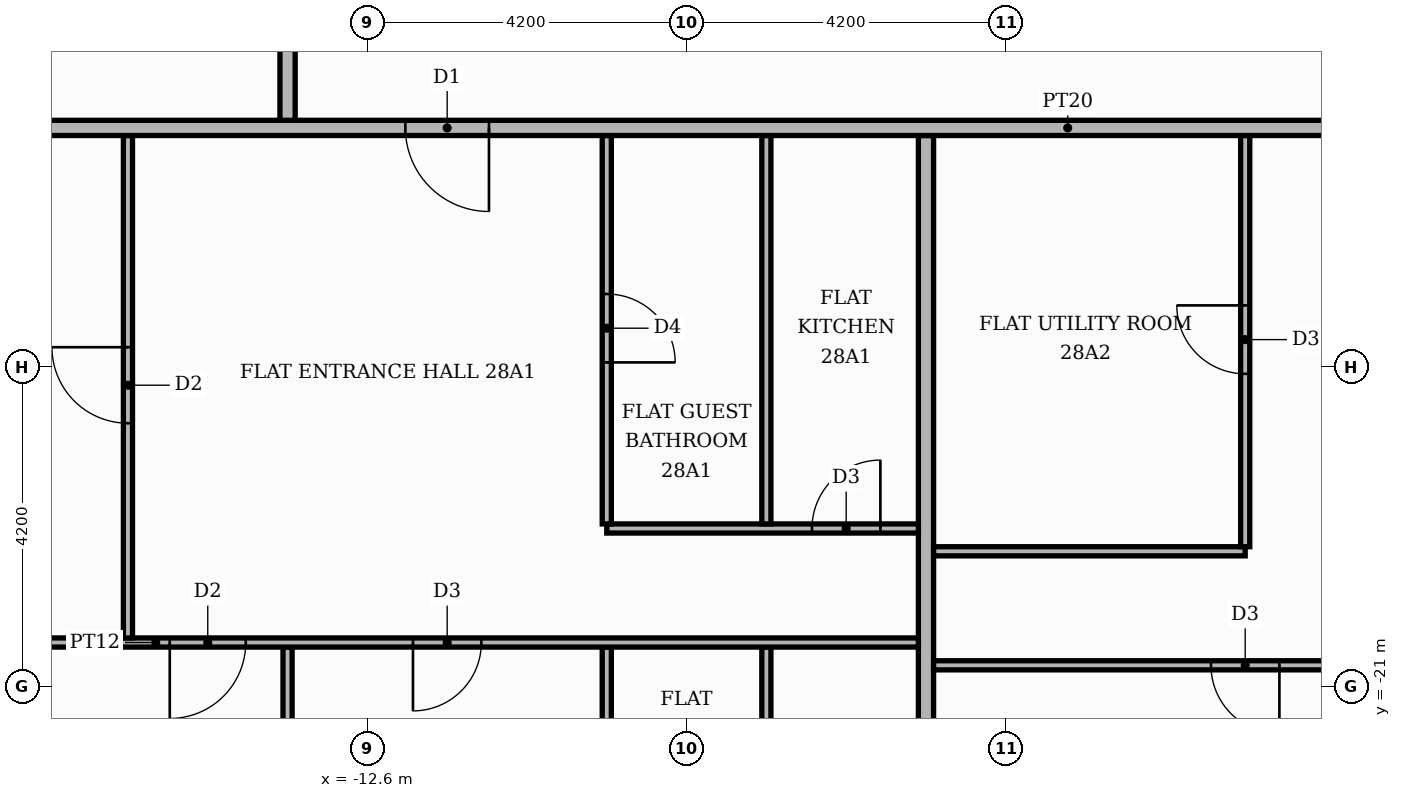
"""IFC4 building model, lengths in metres.
Left out: names, types, materials, properties, quantities, classifications, styles, units other than length and angle.
Written with IfcOpenShell. Run it as: python <this file> out.ifc"""

import sys

from ifc_helpers import new_model, si_unit, direction, frame, frame_2d, origin, place, context, subcontext, project, spatial, rectangle, extrude, element, fill, save


model = new_model("IFC4")
c1 = context("Model", 3, precision=1e-05, world=origin(), true_north=direction((0.0, 1.0)))
c2 = subcontext(c1, "Body", "Model", "MODEL_VIEW")
j1 = project(units=[si_unit("LENGTHUNIT", "METRE"), si_unit("PLANEANGLEUNIT", "RADIAN")], contexts=[c1])
p1 = place(None, origin())
s1 = spatial("IfcSite", under=j1, at=p1, CompositionType="ELEMENT")
p2 = place(p1, origin())
s2 = spatial("IfcBuilding", under=s1, at=p2, CompositionType="ELEMENT")
p3 = place(p2, frame((0.0, 0.0, 118.2)))
s3 = spatial("IfcBuildingStorey", under=s2, at=p3, CompositionType="ELEMENT", Elevation=118.2)
p4 = place(p3, frame((-13.65, -25.42, 0.0), z_axis=(0.0, 0.0, 1.0), x_axis=(0.0, 1.0, 0.0)))
e1 = element("IfcWall", 1, at=p4, inside=s3, PredefinedType="PARTITIONING", context=c2, shape_type="SweptSolid", body=[
    extrude(rectangle(XDim=4.94, YDim=0.12, at=frame_2d((2.47, 0.0))), origin(), (0.0, 0.0, 1.0), 3.48),
])
p5 = place(p3, frame((-9.45, -25.42, 0.0), z_axis=(0.0, 0.0, 1.0), x_axis=(0.0, 1.0, 0.0)))
e2 = element("IfcWall", 2, at=p5, inside=s3, PredefinedType="PARTITIONING", context=c2, shape_type="SweptSolid", body=[
    extrude(rectangle(XDim=4.94, YDim=0.12, at=frame_2d((2.47, 0.0))), origin(), (0.0, 0.0, 1.0), 3.48),
])
p6 = place(p5, frame((1.9, 0.0, 0.0)))
e3 = element("IfcOpeningElement", 3, at=p6, cuts=e2, PredefinedType="OPENING", context=c2, shape_type="SweptSolid", body=[
    extrude(rectangle(XDim=0.9, YDim=2.1, at=frame_2d((0.45, 1.05))), frame((0.0, 0.07, 0.0), z_axis=(0.0, -1.0, 0.0), x_axis=(1.0, 0.0, 0.0)), (0.0, 0.0, 1.0), 0.14),
])
p7 = place(p3, frame((-7.35, -25.42, 0.0), z_axis=(0.0, 0.0, 1.0), x_axis=(0.0, 1.0, 0.0)))
e4 = element("IfcWall", 4, at=p7, inside=s3, PredefinedType="PARTITIONING", context=c2, shape_type="SweptSolid", body=[
    extrude(rectangle(XDim=4.94, YDim=0.12, at=frame_2d((2.47, 0.0))), origin(), (0.0, 0.0, 1.0), 3.48),
])
p8 = place(p7, frame((1.9, 0.0, 0.0)))
e5 = element("IfcOpeningElement", 5, at=p8, cuts=e4, PredefinedType="OPENING", context=c2, shape_type="SweptSolid", body=[
    extrude(rectangle(XDim=0.9, YDim=2.1, at=frame_2d((0.45, 1.05))), frame((0.0, 0.07, 0.0), z_axis=(0.0, -1.0, 0.0), x_axis=(1.0, 0.0, 0.0)), (0.0, 0.0, 1.0), 0.14),
])
p9 = place(p3, frame((-5.25, -25.42, 0.0), z_axis=(0.0, 0.0, 1.0), x_axis=(0.0, 1.0, 0.0)))
e6 = element("IfcWall", 6, at=p9, inside=s3, PredefinedType="PARTITIONING", context=c2, shape_type="SweptSolid", body=[
    extrude(rectangle(XDim=11.67, YDim=0.2, at=frame_2d((5.835, 0.0))), origin(), (0.0, 0.0, 1.0), 3.48),
])
p10 = place(p3, frame((-5.15, -20.72, 0.0), z_axis=(0.0, 0.0, 1.0), x_axis=(1.0, 0.0, 0.0)))
e7 = element("IfcWall", 7, at=p10, inside=s3, PredefinedType="PARTITIONING", context=c2, shape_type="SweptSolid", body=[
    extrude(rectangle(XDim=18.7, YDim=0.12, at=frame_2d((9.35, 0.0))), origin(), (0.0, 0.0, 1.0), 3.48),
])
p11 = place(p10, frame((3.65, 0.0, 0.0)))
e8 = element("IfcOpeningElement", 8, at=p11, cuts=e7, PredefinedType="OPENING", context=c2, shape_type="SweptSolid", body=[
    extrude(rectangle(XDim=0.9, YDim=2.1, at=frame_2d((0.45, 1.05))), frame((0.0, 0.07, 0.0), z_axis=(0.0, -1.0, 0.0), x_axis=(1.0, 0.0, 0.0)), (0.0, 0.0, 1.0), 0.14),
])
p12 = place(p10, frame((15.15, 0.0, 0.0)))
e9 = element("IfcOpeningElement", 9, at=p12, cuts=e7, PredefinedType="OPENING", context=c2, shape_type="SweptSolid", body=[
    extrude(rectangle(XDim=1.0, YDim=2.1, at=frame_2d((0.5, 1.05))), frame((0.0, 0.07, 0.0), z_axis=(0.0, -1.0, 0.0), x_axis=(1.0, 0.0, 0.0)), (0.0, 0.0, 1.0), 0.14),
])
p13 = place(p3, frame((-25.42, -20.42, 0.0), z_axis=(0.0, 0.0, 1.0), x_axis=(1.0, 0.0, 0.0)))
e10 = element("IfcWall", 10, at=p13, inside=s3, PredefinedType="PARTITIONING", context=c2, shape_type="SweptSolid", body=[
    extrude(rectangle(XDim=20.07, YDim=0.12, at=frame_2d((10.035, 0.0))), origin(), (0.0, 0.0, 1.0), 3.48),
])
p14 = place(p13, frame((10.22, 0.0, 0.0)))
e11 = element("IfcOpeningElement", 11, at=p14, cuts=e10, PredefinedType="OPENING", context=c2, shape_type="SweptSolid", body=[
    extrude(rectangle(XDim=1.0, YDim=2.1, at=frame_2d((0.5, 1.05))), frame((0.0, 0.07, 0.0), z_axis=(0.0, -1.0, 0.0), x_axis=(1.0, 0.0, 0.0)), (0.0, 0.0, 1.0), 0.14),
])
p15 = place(p13, frame((13.42, 0.0, 0.0)))
e12 = element("IfcOpeningElement", 12, at=p15, cuts=e10, PredefinedType="OPENING", context=c2, shape_type="SweptSolid", body=[
    extrude(rectangle(XDim=0.9, YDim=2.1, at=frame_2d((0.45, 1.05))), frame((0.0, 0.07, 0.0), z_axis=(0.0, -1.0, 0.0), x_axis=(1.0, 0.0, 0.0)), (0.0, 0.0, 1.0), 0.14),
])
p16 = place(p3, frame((-15.75, -20.36, 0.0), z_axis=(0.0, 0.0, 1.0), x_axis=(0.0, 1.0, 0.0)))
e13 = element("IfcWall", 13, at=p16, inside=s3, PredefinedType="PARTITIONING", context=c2, shape_type="SweptSolid", body=[
    extrude(rectangle(XDim=6.61, YDim=0.12, at=frame_2d((3.305, 0.0))), origin(), (0.0, 0.0, 1.0), 3.48),
])
p17 = place(p16, frame((2.825, 0.0, 0.0)))
e14 = element("IfcOpeningElement", 14, at=p17, cuts=e13, PredefinedType="OPENING", context=c2, shape_type="SweptSolid", body=[
    extrude(rectangle(XDim=1.0, YDim=2.1, at=frame_2d((0.5, 1.05))), frame((0.0, 0.07, 0.0), z_axis=(0.0, -1.0, 0.0), x_axis=(1.0, 0.0, 0.0)), (0.0, 0.0, 1.0), 0.14),
])
p18 = place(p3, frame((-5.15, -19.22, 0.0), z_axis=(0.0, 0.0, 1.0), x_axis=(1.0, 0.0, 0.0)))
e15 = element("IfcWall", 15, at=p18, inside=s3, PredefinedType="PARTITIONING", context=c2, shape_type="SweptSolid", body=[
    extrude(rectangle(XDim=4.1, YDim=0.12, at=frame_2d((2.05, 0.0))), origin(), (0.0, 0.0, 1.0), 3.48),
])
p19 = place(p3, frame((-1.05, -19.16, 0.0), z_axis=(0.0, 0.0, 1.0), x_axis=(0.0, 1.0, 0.0)))
e16 = element("IfcWall", 16, at=p19, inside=s3, PredefinedType="PARTITIONING", context=c2, shape_type="SweptSolid", body=[
    extrude(rectangle(XDim=5.41, YDim=0.12, at=frame_2d((2.705, 0.0))), origin(), (0.0, 0.0, 1.0), 3.48),
])
p20 = place(p19, frame((2.275, 0.0, 0.0)))
e17 = element("IfcOpeningElement", 17, at=p20, cuts=e16, PredefinedType="OPENING", context=c2, shape_type="SweptSolid", body=[
    extrude(rectangle(XDim=0.9, YDim=2.1, at=frame_2d((0.45, 1.05))), frame((0.0, 0.07, 0.0), z_axis=(0.0, -1.0, 0.0), x_axis=(1.0, 0.0, 0.0)), (0.0, 0.0, 1.0), 0.14),
])
p21 = place(p3, frame((-9.45, -18.92, 0.0), z_axis=(0.0, 0.0, 1.0), x_axis=(1.0, 0.0, 0.0)))
e18 = element("IfcWall", 18, at=p21, inside=s3, PredefinedType="PARTITIONING", context=c2, shape_type="SweptSolid", body=[
    extrude(rectangle(XDim=4.1, YDim=0.12, at=frame_2d((2.05, 0.0))), origin(), (0.0, 0.0, 1.0), 3.48),
])
p22 = place(p21, frame((2.7, 0.0, 0.0)))
e19 = element("IfcOpeningElement", 19, at=p22, cuts=e18, PredefinedType="OPENING", context=c2, shape_type="SweptSolid", body=[
    extrude(rectangle(XDim=0.9, YDim=2.1, at=frame_2d((0.45, 1.05))), frame((0.0, 0.07, 0.0), z_axis=(0.0, -1.0, 0.0), x_axis=(1.0, 0.0, 0.0)), (0.0, 0.0, 1.0), 0.14),
])
p23 = place(p3, frame((-9.45, -18.86, 0.0), z_axis=(0.0, 0.0, 1.0), x_axis=(0.0, 1.0, 0.0)))
e20 = element("IfcWall", 20, at=p23, inside=s3, PredefinedType="PARTITIONING", context=c2, shape_type="SweptSolid", body=[
    extrude(rectangle(XDim=5.11, YDim=0.12, at=frame_2d((2.555, 0.0))), origin(), (0.0, 0.0, 1.0), 3.48),
])
p24 = place(p23, frame((2.125, 0.0, 0.0)))
e21 = element("IfcOpeningElement", 21, at=p24, cuts=e20, PredefinedType="OPENING", context=c2, shape_type="SweptSolid", body=[
    extrude(rectangle(XDim=0.9, YDim=2.1, at=frame_2d((0.45, 1.05))), frame((0.0, 0.07, 0.0), z_axis=(0.0, -1.0, 0.0), x_axis=(1.0, 0.0, 0.0)), (0.0, 0.0, 1.0), 0.14),
])
p25 = place(p3, frame((-7.35, -18.86, 0.0), z_axis=(0.0, 0.0, 1.0), x_axis=(0.0, 1.0, 0.0)))
e22 = element("IfcWall", 22, at=p25, inside=s3, PredefinedType="PARTITIONING", context=c2, shape_type="SweptSolid", body=[
    extrude(rectangle(XDim=5.11, YDim=0.12, at=frame_2d((2.555, 0.0))), origin(), (0.0, 0.0, 1.0), 3.48),
])
p26 = place(p3, frame((-20.42, -13.65, 0.0), z_axis=(0.0, 0.0, 1.0), x_axis=(1.0, 0.0, 0.0)))
e23 = element("IfcWall", 23, at=p26, inside=s3, PredefinedType="PARTITIONING", context=c2, shape_type="SweptSolid", body=[
    extrude(rectangle(XDim=34.07, YDim=0.2, at=frame_2d((17.035, 0.0))), origin(), (0.0, 0.0, 1.0), 3.48),
])
p27 = place(p26, frame((8.32, 0.0, 0.0)))
e24 = element("IfcOpeningElement", 24, at=p27, cuts=e23, PredefinedType="OPENING", context=c2, shape_type="SweptSolid", body=[
    extrude(rectangle(XDim=1.1, YDim=2.4, at=frame_2d((0.55, 1.2))), frame((0.0, 0.11, 0.0), z_axis=(0.0, -1.0, 0.0), x_axis=(1.0, 0.0, 0.0)), (0.0, 0.0, 1.0), 0.22),
])
p28 = place(p26, frame((20.92, 0.0, 0.0)))
e25 = element("IfcOpeningElement", 25, at=p28, cuts=e23, PredefinedType="OPENING", context=c2, shape_type="SweptSolid", body=[
    extrude(rectangle(XDim=1.1, YDim=2.4, at=frame_2d((0.55, 1.2))), frame((0.0, 0.11, 0.0), z_axis=(0.0, -1.0, 0.0), x_axis=(1.0, 0.0, 0.0)), (0.0, 0.0, 1.0), 0.22),
])
p29 = place(p3, frame((-13.65, -13.55, 0.0), z_axis=(0.0, 0.0, 1.0), x_axis=(0.0, 1.0, 0.0)))
e26 = element("IfcWall", 26, at=p29, inside=s3, PredefinedType="PARTITIONING", context=c2, shape_type="SweptSolid", body=[
    extrude(rectangle(XDim=18.7, YDim=0.2, at=frame_2d((9.35, 0.0))), origin(), (0.0, 0.0, 1.0), 3.48),
])
p30 = place(p29, frame((14.05, 0.0, 0.0)))
e27 = element("IfcOpeningElement", 27, at=p30, cuts=e26, PredefinedType="OPENING", context=c2, shape_type="SweptSolid", body=[
    extrude(rectangle(XDim=1.1, YDim=2.4, at=frame_2d((0.55, 1.2))), frame((0.0, 0.11, 0.0), z_axis=(0.0, -1.0, 0.0), x_axis=(1.0, 0.0, 0.0)), (0.0, 0.0, 1.0), 0.22),
])
p31 = place(p27, frame((1.1, 0.0, 0.0), z_axis=(0.0, 0.0, 1.0), x_axis=(-1.0, 0.0, 0.0)))
e28 = element("IfcDoor", 28, at=p31, inside=s3, OperationType="SINGLE_SWING_RIGHT", PredefinedType="DOOR", context=c2, shape_type="SweptSolid", body=[
    extrude(rectangle(XDim=1.1, YDim=2.4, at=frame_2d((0.55, 1.2))), frame((0.0, 0.025, 0.0), z_axis=(0.0, -1.0, 0.0), x_axis=(1.0, 0.0, 0.0)), (0.0, 0.0, 1.0), 0.05),
])
fill(e24, e28)
p32 = place(p17, origin())
e29 = element("IfcDoor", 29, at=p32, inside=s3, OperationType="SINGLE_SWING_RIGHT", PredefinedType="DOOR", context=c2, shape_type="SweptSolid", body=[
    extrude(rectangle(XDim=1.0, YDim=2.1, at=frame_2d((0.5, 1.05))), frame((0.0, 0.025, 0.0), z_axis=(0.0, -1.0, 0.0), x_axis=(1.0, 0.0, 0.0)), (0.0, 0.0, 1.0), 0.05),
])
fill(e14, e29)
p33 = place(p24, frame((0.9, 0.0, 0.0), z_axis=(0.0, 0.0, 1.0), x_axis=(-1.0, 0.0, 0.0)))
e30 = element("IfcDoor", 30, at=p33, inside=s3, OperationType="SINGLE_SWING_LEFT", PredefinedType="DOOR", context=c2, shape_type="SweptSolid", body=[
    extrude(rectangle(XDim=0.9, YDim=2.1, at=frame_2d((0.45, 1.05))), frame((0.0, 0.025, 0.0), z_axis=(0.0, -1.0, 0.0), x_axis=(1.0, 0.0, 0.0)), (0.0, 0.0, 1.0), 0.05),
])
fill(e21, e30)
p34 = place(p22, origin())
e31 = element("IfcDoor", 31, at=p34, inside=s3, OperationType="SINGLE_SWING_RIGHT", PredefinedType="DOOR", context=c2, shape_type="SweptSolid", body=[
    extrude(rectangle(XDim=0.9, YDim=2.1, at=frame_2d((0.45, 1.05))), frame((0.0, 0.025, 0.0), z_axis=(0.0, -1.0, 0.0), x_axis=(1.0, 0.0, 0.0)), (0.0, 0.0, 1.0), 0.05),
])
fill(e19, e31)
p35 = place(p14, frame((1.0, 0.0, 0.0), z_axis=(0.0, 0.0, 1.0), x_axis=(-1.0, 0.0, 0.0)))
e32 = element("IfcDoor", 32, at=p35, inside=s3, OperationType="SINGLE_SWING_LEFT", PredefinedType="DOOR", context=c2, shape_type="SweptSolid", body=[
    extrude(rectangle(XDim=1.0, YDim=2.1, at=frame_2d((0.5, 1.05))), frame((0.0, 0.025, 0.0), z_axis=(0.0, -1.0, 0.0), x_axis=(1.0, 0.0, 0.0)), (0.0, 0.0, 1.0), 0.05),
])
fill(e11, e32)
p36 = place(p15, frame((0.9, 0.0, 0.0), z_axis=(0.0, 0.0, 1.0), x_axis=(-1.0, 0.0, 0.0)))
e33 = element("IfcDoor", 33, at=p36, inside=s3, OperationType="SINGLE_SWING_LEFT", PredefinedType="DOOR", context=c2, shape_type="SweptSolid", body=[
    extrude(rectangle(XDim=0.9, YDim=2.1, at=frame_2d((0.45, 1.05))), frame((0.0, 0.025, 0.0), z_axis=(0.0, -1.0, 0.0), x_axis=(1.0, 0.0, 0.0)), (0.0, 0.0, 1.0), 0.05),
])
fill(e12, e33)
p37 = place(p20, origin())
e34 = element("IfcDoor", 34, at=p37, inside=s3, OperationType="SINGLE_SWING_RIGHT", PredefinedType="DOOR", context=c2, shape_type="SweptSolid", body=[
    extrude(rectangle(XDim=0.9, YDim=2.1, at=frame_2d((0.45, 1.05))), frame((0.0, 0.025, 0.0), z_axis=(0.0, -1.0, 0.0), x_axis=(1.0, 0.0, 0.0)), (0.0, 0.0, 1.0), 0.05),
])
fill(e17, e34)
p38 = place(p11, frame((0.9, 0.0, 0.0), z_axis=(0.0, 0.0, 1.0), x_axis=(-1.0, 0.0, 0.0)))
e35 = element("IfcDoor", 35, at=p38, inside=s3, OperationType="SINGLE_SWING_RIGHT", PredefinedType="DOOR", context=c2, shape_type="SweptSolid", body=[
    extrude(rectangle(XDim=0.9, YDim=2.1, at=frame_2d((0.45, 1.05))), frame((0.0, 0.025, 0.0), z_axis=(0.0, -1.0, 0.0), x_axis=(1.0, 0.0, 0.0)), (0.0, 0.0, 1.0), 0.05),
])
fill(e8, e35)
save(model, sys.argv[1])
